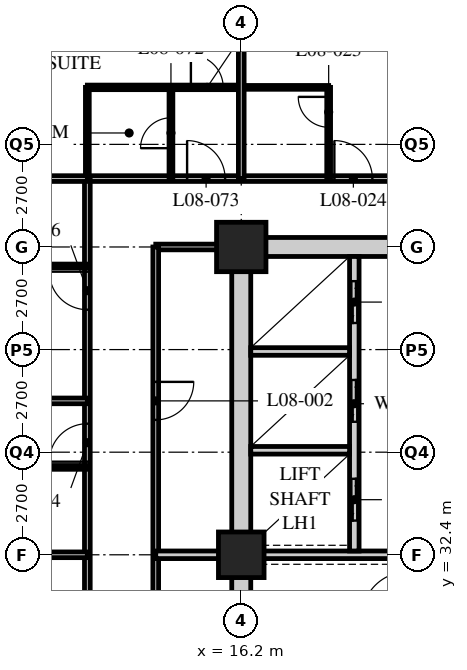
"""IFC4 building model, lengths in metres.
Left out: names, types, materials, properties, quantities, classifications, styles, units other than length and angle.
Written with IfcOpenShell. Run it as: python <this file> out.ifc"""

import sys

from ifc_helpers import new_model, si_unit, direction, frame, frame_2d, origin, origin_2d, place, context, subcontext, project, spatial, rectangle, hollow_rectangle, extrude, element, fill, save


model = new_model("IFC4")
c1 = context("Model", 3, precision=1e-05, world=origin(), true_north=direction((0.0, 1.0)))
c2 = subcontext(c1, "Body", "Model", "MODEL_VIEW")
j1 = project(units=[si_unit("LENGTHUNIT", "METRE"), si_unit("PLANEANGLEUNIT", "RADIAN")], contexts=[c1])
p1 = place(None, origin())
s1 = spatial("IfcSite", under=j1, at=p1, CompositionType="ELEMENT")
p2 = place(p1, origin())
s2 = spatial("IfcBuilding", under=s1, at=p2, CompositionType="ELEMENT")
p3 = place(p2, frame((0.0, 0.0, 39.8)))
s3 = spatial("IfcBuildingStorey", under=s2, at=p3, CompositionType="ELEMENT", Elevation=39.8)
p4 = place(p3, frame((16.2, 32.4, 0.0), z_axis=(0.0, 0.0, 1.0), x_axis=(1.0, 0.0, 0.0)))
e1 = element("IfcColumn", 1, at=p4, inside=s3, PredefinedType="COLUMN", context=c2, shape_type="SweptSolid", body=[
    extrude(hollow_rectangle(XDim=1.2, YDim=1.2, WallThickness=0.12, at=origin_2d()), origin(), (0.0, 0.0, 1.0), 3.4),
])
p5 = place(p3, frame((16.2, 40.5, 0.0), z_axis=(0.0, 0.0, 1.0), x_axis=(1.0, 0.0, 0.0)))
e2 = element("IfcColumn", 2, at=p5, inside=s3, PredefinedType="COLUMN", context=c2, shape_type="SweptSolid", body=[
    extrude(hollow_rectangle(XDim=1.3, YDim=1.3, WallThickness=0.13, at=origin_2d()), origin(), (0.0, 0.0, 1.0), 3.4),
])
p6 = place(p3, frame((12.15, 42.3, 0.0), z_axis=(0.0, 0.0, 1.0), x_axis=(1.0, 0.0, 0.0)))
e3 = element("IfcWall", 3, at=p6, inside=s3, PredefinedType="PARTITIONING", context=c2, shape_type="SweptSolid", body=[
    extrude(rectangle(XDim=32.4, YDim=0.15, at=frame_2d((16.2, 0.0))), origin(), (0.0, 0.0, 1.0), 3.19),
])
p7 = place(p6, frame((6.5, 0.0, 0.0)))
e4 = element("IfcOpeningElement", 4, at=p7, cuts=e3, PredefinedType="OPENING", context=c2, shape_type="SweptSolid", body=[
    extrude(rectangle(XDim=1.0, YDim=2.1, at=frame_2d((0.5, 1.05))), frame((0.0, 0.085, 0.0), z_axis=(0.0, -1.0, 0.0), x_axis=(1.0, 0.0, 0.0)), (0.0, 0.0, 1.0), 0.17),
])
p8 = place(p6, frame((8.4, 0.0, 0.0)))
e5 = element("IfcOpeningElement", 5, at=p8, cuts=e3, PredefinedType="OPENING", context=c2, shape_type="SweptSolid", body=[
    extrude(rectangle(XDim=1.0, YDim=2.1, at=frame_2d((0.5, 1.05))), frame((0.0, 0.085, 0.0), z_axis=(0.0, -1.0, 0.0), x_axis=(1.0, 0.0, 0.0)), (0.0, 0.0, 1.0), 0.17),
])
p9 = place(p6, frame((14.6, 0.0, 0.0)))
e6 = element("IfcOpeningElement", 6, at=p9, cuts=e3, PredefinedType="OPENING", context=c2, shape_type="SweptSolid", body=[
    extrude(rectangle(XDim=1.0, YDim=2.1, at=frame_2d((0.5, 1.05))), frame((0.0, 0.085, 0.0), z_axis=(0.0, -1.0, 0.0), x_axis=(1.0, 0.0, 0.0)), (0.0, 0.0, 1.0), 0.17),
])
p10 = place(p6, frame((18.65, 0.0, 0.0)))
e7 = element("IfcOpeningElement", 7, at=p10, cuts=e3, PredefinedType="OPENING", context=c2, shape_type="SweptSolid", body=[
    extrude(rectangle(XDim=1.0, YDim=2.1, at=frame_2d((0.5, 1.05))), frame((0.0, 0.085, 0.0), z_axis=(0.0, -1.0, 0.0), x_axis=(1.0, 0.0, 0.0)), (0.0, 0.0, 1.0), 0.17),
])
p11 = place(p6, frame((23.0, 0.0, 0.0)))
e8 = element("IfcOpeningElement", 8, at=p11, cuts=e3, PredefinedType="OPENING", context=c2, shape_type="SweptSolid", body=[
    extrude(rectangle(XDim=1.0, YDim=2.1, at=frame_2d((0.5, 1.05))), frame((0.0, 0.085, 0.0), z_axis=(0.0, -1.0, 0.0), x_axis=(1.0, 0.0, 0.0)), (0.0, 0.0, 1.0), 0.17),
])
p12 = place(p6, frame((26.75, 0.0, 0.0)))
e9 = element("IfcOpeningElement", 9, at=p12, cuts=e3, PredefinedType="OPENING", context=c2, shape_type="SweptSolid", body=[
    extrude(rectangle(XDim=1.0, YDim=2.1, at=frame_2d((0.5, 1.05))), frame((0.0, 0.085, 0.0), z_axis=(0.0, -1.0, 0.0), x_axis=(1.0, 0.0, 0.0)), (0.0, 0.0, 1.0), 0.17),
])
p13 = place(p6, frame((28.775, 0.0, 0.0)))
e10 = element("IfcOpeningElement", 10, at=p13, cuts=e3, PredefinedType="OPENING", context=c2, shape_type="SweptSolid", body=[
    extrude(rectangle(XDim=1.0, YDim=2.1, at=frame_2d((0.5, 1.05))), frame((0.0, 0.085, 0.0), z_axis=(0.0, -1.0, 0.0), x_axis=(1.0, 0.0, 0.0)), (0.0, 0.0, 1.0), 0.17),
])
p14 = place(p6, frame((2.625, 0.0, 0.0)))
e11 = element("IfcOpeningElement", 11, at=p14, cuts=e3, PredefinedType="OPENING", context=c2, shape_type="SweptSolid", body=[
    extrude(rectangle(XDim=1.0, YDim=2.1, at=frame_2d((0.5, 1.05))), frame((0.0, 0.085, 0.0), z_axis=(0.0, -1.0, 0.0), x_axis=(1.0, 0.0, 0.0)), (0.0, 0.0, 1.0), 0.17),
])
p15 = place(p3, frame((12.15, 16.2, 0.0), z_axis=(0.0, 0.0, 1.0), x_axis=(0.0, 1.0, 0.0)))
e12 = element("IfcWall", 12, at=p15, inside=s3, PredefinedType="PARTITIONING", context=c2, shape_type="SweptSolid", body=[
    extrude(rectangle(XDim=26.1, YDim=0.15, at=frame_2d((13.05, 0.0))), origin(), (0.0, 0.0, 1.0), 3.19),
])
p16 = place(p15, frame((2.75, 0.0, 0.0)))
e13 = element("IfcOpeningElement", 13, at=p16, cuts=e12, PredefinedType="OPENING", context=c2, shape_type="SweptSolid", body=[
    extrude(rectangle(XDim=1.0, YDim=2.1, at=frame_2d((0.5, 1.05))), frame((0.0, 0.085, 0.0), z_axis=(0.0, -1.0, 0.0), x_axis=(1.0, 0.0, 0.0)), (0.0, 0.0, 1.0), 0.17),
])
p17 = place(p15, frame((4.35, 0.0, 0.0)))
e14 = element("IfcOpeningElement", 14, at=p17, cuts=e12, PredefinedType="OPENING", context=c2, shape_type="SweptSolid", body=[
    extrude(rectangle(XDim=1.0, YDim=2.1, at=frame_2d((0.5, 1.05))), frame((0.0, 0.085, 0.0), z_axis=(0.0, -1.0, 0.0), x_axis=(1.0, 0.0, 0.0)), (0.0, 0.0, 1.0), 0.17),
])
p18 = place(p15, frame((10.55, 0.0, 0.0)))
e15 = element("IfcOpeningElement", 15, at=p18, cuts=e12, PredefinedType="OPENING", context=c2, shape_type="SweptSolid", body=[
    extrude(rectangle(XDim=1.0, YDim=2.1, at=frame_2d((0.5, 1.05))), frame((0.0, 0.085, 0.0), z_axis=(0.0, -1.0, 0.0), x_axis=(1.0, 0.0, 0.0)), (0.0, 0.0, 1.0), 0.17),
])
p19 = place(p15, frame((12.45, 0.0, 0.0)))
e16 = element("IfcOpeningElement", 16, at=p19, cuts=e12, PredefinedType="OPENING", context=c2, shape_type="SweptSolid", body=[
    extrude(rectangle(XDim=1.0, YDim=2.1, at=frame_2d((0.5, 1.05))), frame((0.0, 0.085, 0.0), z_axis=(0.0, -1.0, 0.0), x_axis=(1.0, 0.0, 0.0)), (0.0, 0.0, 1.0), 0.17),
])
p20 = place(p15, frame((18.65, 0.0, 0.0)))
e17 = element("IfcOpeningElement", 17, at=p20, cuts=e12, PredefinedType="OPENING", context=c2, shape_type="SweptSolid", body=[
    extrude(rectangle(XDim=1.0, YDim=2.1, at=frame_2d((0.5, 1.05))), frame((0.0, 0.085, 0.0), z_axis=(0.0, -1.0, 0.0), x_axis=(1.0, 0.0, 0.0)), (0.0, 0.0, 1.0), 0.17),
])
p21 = place(p15, frame((22.65, 0.0, 0.0)))
e18 = element("IfcOpeningElement", 18, at=p21, cuts=e12, PredefinedType="OPENING", context=c2, shape_type="SweptSolid", body=[
    extrude(rectangle(XDim=1.0, YDim=2.1, at=frame_2d((0.5, 1.05))), frame((0.0, 0.085, 0.0), z_axis=(0.0, -1.0, 0.0), x_axis=(1.0, 0.0, 0.0)), (0.0, 0.0, 1.0), 0.17),
])
p22 = place(p3, frame((16.0, 40.5, 0.0), z_axis=(0.0, 0.0, 1.0), x_axis=(-1.0, 0.0, 0.0)))
e19 = element("IfcWall", 19, at=p22, inside=s3, PredefinedType="PARTITIONING", context=c2, shape_type="SweptSolid", body=[
    extrude(rectangle(XDim=2.05, YDim=0.15, at=frame_2d((1.025, 0.0))), origin(), (0.0, 0.0, 1.0), 2.578),
])
p23 = place(p3, frame((13.95, 40.5, 0.0), z_axis=(0.0, 0.0, 1.0), x_axis=(0.0, -1.0, 0.0)))
e20 = element("IfcWall", 20, at=p23, inside=s3, PredefinedType="PARTITIONING", context=c2, shape_type="SweptSolid", body=[
    extrude(rectangle(XDim=22.5, YDim=0.15, at=frame_2d((11.25, 0.0))), origin(), (0.0, 0.0, 1.0), 3.19),
])
p24 = place(p23, frame((11.65, 0.0, 0.0)))
e21 = element("IfcOpeningElement", 21, at=p24, cuts=e20, PredefinedType="OPENING", context=c2, shape_type="SweptSolid", body=[
    extrude(rectangle(XDim=1.0, YDim=2.1, at=frame_2d((0.5, 1.05))), frame((0.0, 0.085, 0.0), z_axis=(0.0, -1.0, 0.0), x_axis=(1.0, 0.0, 0.0)), (0.0, 0.0, 1.0), 0.17),
])
p25 = place(p23, frame((3.55, 0.0, 0.0)))
e22 = element("IfcOpeningElement", 22, at=p25, cuts=e20, PredefinedType="OPENING", context=c2, shape_type="SweptSolid", body=[
    extrude(rectangle(XDim=1.0, YDim=2.1, at=frame_2d((0.5, 1.05))), frame((0.0, 0.085, 0.0), z_axis=(0.0, -1.0, 0.0), x_axis=(1.0, 0.0, 0.0)), (0.0, 0.0, 1.0), 0.17),
])
p26 = place(p3, frame((13.95, 32.4, 0.0), z_axis=(0.0, 0.0, 1.0), x_axis=(1.0, 0.0, 0.0)))
e23 = element("IfcWall", 23, at=p26, inside=s3, PredefinedType="SOLIDWALL", context=c2, shape_type="SweptSolid", body=[
    extrude(rectangle(XDim=2.25, YDim=0.2, at=frame_2d((1.125, 0.0))), origin(), (0.0, 0.0, 1.0), 2.578),
])
p27 = place(p3, frame((16.2, 44.7, 0.0), z_axis=(0.0, 0.0, 1.0), x_axis=(1.0, 0.0, 0.0)))
e24 = element("IfcWall", 24, at=p27, inside=s3, PredefinedType="PARTITIONING", context=c2, shape_type="SweptSolid", body=[
    extrude(rectangle(XDim=2.3, YDim=0.1, at=frame_2d((1.15, 0.0))), origin(), (0.0, 0.0, 1.0), 3.19),
])
p28 = place(p3, frame((18.5, 42.3, 0.0), z_axis=(0.0, 0.0, 1.0), x_axis=(0.0, 1.0, 0.0)))
e25 = element("IfcWall", 25, at=p28, inside=s3, PredefinedType="PARTITIONING", context=c2, shape_type="SweptSolid", body=[
    extrude(rectangle(XDim=2.4, YDim=0.1, at=frame_2d((1.2, 0.0))), origin(), (0.0, 0.0, 1.0), 3.19),
])
p29 = place(p28, frame((1.35, 0.0, 0.0)))
e26 = element("IfcOpeningElement", 26, at=p29, cuts=e25, PredefinedType="OPENING", context=c2, shape_type="SweptSolid", body=[
    extrude(rectangle(XDim=0.8, YDim=2.1, at=frame_2d((0.4, 1.05))), frame((0.0, 0.06, 0.0), z_axis=(0.0, -1.0, 0.0), x_axis=(1.0, 0.0, 0.0)), (0.0, 0.0, 1.0), 0.12),
])
p30 = place(p3, frame((12.15, 32.4, 0.0), z_axis=(0.0, 0.0, 1.0), x_axis=(-1.0, 0.0, 0.0)))
e27 = element("IfcWall", 27, at=p30, inside=s3, PredefinedType="PARTITIONING", context=c2, shape_type="SweptSolid", body=[
    extrude(rectangle(XDim=11.85, YDim=0.15, at=frame_2d((5.925, 0.0))), origin(), (0.0, 0.0, 1.0), 2.578),
])
p31 = place(p3, frame((12.15, 34.7, 0.0), z_axis=(0.0, 0.0, 1.0), x_axis=(-1.0, 0.0, 0.0)))
e28 = element("IfcWall", 28, at=p31, inside=s3, PredefinedType="PARTITIONING", context=c2, shape_type="SweptSolid", body=[
    extrude(rectangle(XDim=3.0, YDim=0.1, at=frame_2d((1.5, 0.0))), origin(), (0.0, 0.0, 1.0), 3.19),
])
p32 = place(p31, frame((1.95, 0.0, 0.0)))
e29 = element("IfcOpeningElement", 29, at=p32, cuts=e28, PredefinedType="OPENING", context=c2, shape_type="SweptSolid", body=[
    extrude(rectangle(XDim=0.8, YDim=2.1, at=frame_2d((0.4, 1.05))), frame((0.0, 0.06, 0.0), z_axis=(0.0, -1.0, 0.0), x_axis=(1.0, 0.0, 0.0)), (0.0, 0.0, 1.0), 0.12),
])
p33 = place(p3, frame((12.15, 36.45, 0.0), z_axis=(0.0, 0.0, 1.0), x_axis=(-1.0, 0.0, 0.0)))
e30 = element("IfcWall", 30, at=p33, inside=s3, PredefinedType="PARTITIONING", context=c2, shape_type="SweptSolid", body=[
    extrude(rectangle(XDim=11.85, YDim=0.15, at=frame_2d((5.925, 0.0))), origin(), (0.0, 0.0, 1.0), 3.19),
])
p34 = place(p3, frame((12.15, 40.0, 0.0), z_axis=(0.0, 0.0, 1.0), x_axis=(-1.0, 0.0, 0.0)))
e31 = element("IfcWall", 31, at=p34, inside=s3, PredefinedType="PARTITIONING", context=c2, shape_type="SweptSolid", body=[
    extrude(rectangle(XDim=3.515, YDim=0.1, at=frame_2d((1.757, 0.0))), origin(), (0.0, 0.0, 1.0), 3.19),
])
p35 = place(p34, frame((1.965, 0.0, 0.0)))
e32 = element("IfcOpeningElement", 32, at=p35, cuts=e31, PredefinedType="OPENING", context=c2, shape_type="SweptSolid", body=[
    extrude(rectangle(XDim=0.8, YDim=2.1, at=frame_2d((0.4, 1.05))), frame((0.0, 0.06, 0.0), z_axis=(0.0, -1.0, 0.0), x_axis=(1.0, 0.0, 0.0)), (0.0, 0.0, 1.0), 0.12),
])
p36 = place(p3, frame((12.15, 44.7, 0.0), z_axis=(0.0, 0.0, 1.0), x_axis=(1.0, 0.0, 0.0)))
e33 = element("IfcWall", 33, at=p36, inside=s3, PredefinedType="PARTITIONING", context=c2, shape_type="SweptSolid", body=[
    extrude(rectangle(XDim=4.05, YDim=0.12, at=frame_2d((2.025, 0.0))), origin(), (0.0, 0.0, 1.0), 3.19),
])
p37 = place(p36, frame((2.725, 0.0, 0.0)))
e34 = element("IfcOpeningElement", 34, at=p37, cuts=e33, PredefinedType="OPENING", context=c2, shape_type="SweptSolid", body=[
    extrude(rectangle(XDim=0.85, YDim=2.1, at=frame_2d((0.425, 1.05))), frame((0.0, 0.07, 0.0), z_axis=(0.0, -1.0, 0.0), x_axis=(1.0, 0.0, 0.0)), (0.0, 0.0, 1.0), 0.14),
])
p38 = place(p3, frame((14.35, 42.3, 0.0), z_axis=(0.0, 0.0, 1.0), x_axis=(0.0, 1.0, 0.0)))
e35 = element("IfcWall", 35, at=p38, inside=s3, PredefinedType="PARTITIONING", context=c2, shape_type="SweptSolid", body=[
    extrude(rectangle(XDim=2.4, YDim=0.1, at=frame_2d((1.2, 0.0))), origin(), (0.0, 0.0, 1.0), 3.19),
])
p39 = place(p38, frame((0.8, 0.0, 0.0)))
e36 = element("IfcOpeningElement", 36, at=p39, cuts=e35, PredefinedType="OPENING", context=c2, shape_type="SweptSolid", body=[
    extrude(rectangle(XDim=0.8, YDim=2.1, at=frame_2d((0.4, 1.05))), frame((0.0, 0.06, 0.0), z_axis=(0.0, -1.0, 0.0), x_axis=(1.0, 0.0, 0.0)), (0.0, 0.0, 1.0), 0.12),
])
p40 = place(p3, frame((12.15, 42.3, 0.0), z_axis=(0.0, 0.0, 1.0), x_axis=(0.0, 1.0, 0.0)))
e37 = element("IfcWall", 37, at=p40, inside=s3, PredefinedType="PARTITIONING", context=c2, shape_type="SweptSolid", body=[
    extrude(rectangle(XDim=2.4, YDim=0.1, at=frame_2d((1.2, 0.0))), origin(), (0.0, 0.0, 1.0), 3.19),
])
p41 = place(p3, frame((4.35, 42.3, 0.0), z_axis=(0.0, 0.0, 1.0), x_axis=(1.0, 0.0, 0.0)))
e38 = element("IfcWall", 38, at=p41, inside=s3, PredefinedType="PARTITIONING", context=c2, shape_type="SweptSolid", body=[
    extrude(rectangle(XDim=7.8, YDim=0.15, at=frame_2d((3.9, 0.0))), origin(), (0.0, 0.0, 1.0), 3.19),
])
p42 = place(p3, frame((16.2, 42.3, 0.0), z_axis=(0.0, 0.0, 1.0), x_axis=(0.0, 1.0, 0.0)))
e39 = element("IfcWall", 39, at=p42, inside=s3, PredefinedType="PARTITIONING", context=c2, shape_type="SweptSolid", body=[
    extrude(rectangle(XDim=6.0, YDim=0.15, at=frame_2d((3.0, 0.0))), origin(), (0.0, 0.0, 1.0), 2.578),
])
p43 = place(p3, frame((15.95, 40.5, 0.0), z_axis=(0.0, 0.0, 1.0), x_axis=(1.0, 0.0, 0.0)))
e40 = element("IfcWall", 40, at=p43, inside=s3, PredefinedType="SOLIDWALL", context=c2, shape_type="SweptSolid", body=[
    extrude(rectangle(XDim=24.8, YDim=0.5, at=frame_2d((12.4, 0.0))), origin(), (0.0, 0.0, 1.0), 2.54),
])
p44 = place(p43, frame((11.5, 0.0, 0.0)))
e41 = element("IfcOpeningElement", 41, at=p44, cuts=e40, PredefinedType="OPENING", context=c2, shape_type="SweptSolid", body=[
    extrude(rectangle(XDim=1.8, YDim=2.4, at=frame_2d((0.9, 1.2))), frame((0.0, 0.26, 0.0), z_axis=(0.0, -1.0, 0.0), x_axis=(1.0, 0.0, 0.0)), (0.0, 0.0, 1.0), 0.52),
])
p45 = place(p3, frame((16.2, 24.55, 0.0), z_axis=(0.0, 0.0, 1.0), x_axis=(0.0, 1.0, 0.0)))
e42 = element("IfcWall", 42, at=p45, inside=s3, PredefinedType="SOLIDWALL", context=c2, shape_type="SweptSolid", body=[
    extrude(rectangle(XDim=15.7, YDim=0.5, at=frame_2d((7.85, 0.0))), origin(), (0.0, 0.0, 1.0), 2.578),
])
p46 = place(p3, frame((16.45, 32.4, 0.0), z_axis=(0.0, 0.0, 1.0), x_axis=(1.0, 0.0, 0.0)))
e43 = element("IfcWall", 43, at=p46, inside=s3, PredefinedType="SOLIDWALL", context=c2, shape_type="SweptSolid", body=[
    extrude(rectangle(XDim=7.95, YDim=0.2, at=frame_2d((3.975, 0.0))), origin(), (0.0, 0.0, 1.0), 2.578),
])
p47 = place(p3, frame((19.175, 32.5, 0.0), z_axis=(0.0, 0.0, 1.0), x_axis=(0.0, 1.0, 0.0)))
e44 = element("IfcWall", 44, at=p47, inside=s3, PredefinedType="SOLIDWALL", context=c2, shape_type="SweptSolid", body=[
    extrude(rectangle(XDim=7.75, YDim=0.25, at=frame_2d((3.875, 0.0))), origin(), (0.0, 0.0, 1.0), 3.19),
])
p48 = place(p47, frame((0.8, 0.0, 0.0)))
e45 = element("IfcOpeningElement", 45, at=p48, cuts=e44, PredefinedType="OPENING", context=c2, shape_type="SweptSolid", body=[
    extrude(rectangle(XDim=1.1, YDim=2.4, at=frame_2d((0.55, 1.2))), frame((0.0, 0.135, 0.0), z_axis=(0.0, -1.0, 0.0), x_axis=(1.0, 0.0, 0.0)), (0.0, 0.0, 1.0), 0.27),
])
p49 = place(p47, frame((3.4, 0.0, 0.0)))
e46 = element("IfcOpeningElement", 46, at=p49, cuts=e44, PredefinedType="OPENING", context=c2, shape_type="SweptSolid", body=[
    extrude(rectangle(XDim=1.1, YDim=2.4, at=frame_2d((0.55, 1.2))), frame((0.0, 0.135, 0.0), z_axis=(0.0, -1.0, 0.0), x_axis=(1.0, 0.0, 0.0)), (0.0, 0.0, 1.0), 0.27),
])
p50 = place(p47, frame((6.0, 0.0, 0.0)))
e47 = element("IfcOpeningElement", 47, at=p50, cuts=e44, PredefinedType="OPENING", context=c2, shape_type="SweptSolid", body=[
    extrude(rectangle(XDim=1.1, YDim=2.4, at=frame_2d((0.55, 1.2))), frame((0.0, 0.135, 0.0), z_axis=(0.0, -1.0, 0.0), x_axis=(1.0, 0.0, 0.0)), (0.0, 0.0, 1.0), 0.27),
])
for number, where, z_axis, x_axis in (
    (48, (16.45, 35.15, 0.0), (0.0, 0.0, 1.0), (1.0, 0.0, 0.0)),
    (49, (16.45, 37.75, 0.0), (0.0, 0.0, 1.0), (1.0, 0.0, 0.0)),
):
    element("IfcWall", number, at=place(p3, frame(where, z_axis=z_axis, x_axis=x_axis)), inside=s3, PredefinedType="SOLIDWALL", context=c2, shape_type="SweptSolid", body=[
        extrude(rectangle(XDim=2.6, YDim=0.2, at=frame_2d((1.3, 0.0))), origin(), (0.0, 0.0, 1.0), 3.19),
    ])
p51 = place(p25, origin())
e50 = element("IfcDoor", 50, at=p51, inside=s3, OperationType="SINGLE_SWING_LEFT", PredefinedType="DOOR", context=c2, shape_type="SweptSolid", body=[
    extrude(rectangle(XDim=1.0, YDim=2.1, at=frame_2d((0.5, 1.05))), frame((0.0, 0.025, 0.0), z_axis=(0.0, -1.0, 0.0), x_axis=(1.0, 0.0, 0.0)), (0.0, 0.0, 1.0), 0.05),
])
fill(e22, e50)
p52 = place(p29, origin())
e51 = element("IfcDoor", 51, at=p52, inside=s3, OperationType="SINGLE_SWING_RIGHT", PredefinedType="DOOR", context=c2, shape_type="SweptSolid", body=[
    extrude(rectangle(XDim=0.8, YDim=2.1, at=frame_2d((0.4, 1.05))), frame((0.0, 0.025, 0.0), z_axis=(0.0, -1.0, 0.0), x_axis=(1.0, 0.0, 0.0)), (0.0, 0.0, 1.0), 0.05),
])
fill(e26, e51)
p53 = place(p7, origin())
e52 = element("IfcDoor", 52, at=p53, inside=s3, OperationType="SINGLE_SWING_LEFT", PredefinedType="DOOR", context=c2, shape_type="SweptSolid", body=[
    extrude(rectangle(XDim=1.0, YDim=2.1, at=frame_2d((0.5, 1.05))), frame((0.0, 0.025, 0.0), z_axis=(0.0, -1.0, 0.0), x_axis=(1.0, 0.0, 0.0)), (0.0, 0.0, 1.0), 0.05),
])
fill(e4, e52)
p54 = place(p20, origin())
e53 = element("IfcDoor", 53, at=p54, inside=s3, OperationType="SINGLE_SWING_LEFT", PredefinedType="DOOR", context=c2, shape_type="SweptSolid", body=[
    extrude(rectangle(XDim=1.0, YDim=2.1, at=frame_2d((0.5, 1.05))), frame((0.0, 0.025, 0.0), z_axis=(0.0, -1.0, 0.0), x_axis=(1.0, 0.0, 0.0)), (0.0, 0.0, 1.0), 0.05),
])
fill(e17, e53)
p55 = place(p21, origin())
e54 = element("IfcDoor", 54, at=p55, inside=s3, OperationType="SINGLE_SWING_RIGHT", PredefinedType="DOOR", context=c2, shape_type="SweptSolid", body=[
    extrude(rectangle(XDim=1.0, YDim=2.1, at=frame_2d((0.5, 1.05))), frame((0.0, 0.025, 0.0), z_axis=(0.0, -1.0, 0.0), x_axis=(1.0, 0.0, 0.0)), (0.0, 0.0, 1.0), 0.05),
])
fill(e18, e54)
p56 = place(p39, origin())
e55 = element("IfcDoor", 55, at=p56, inside=s3, OperationType="SINGLE_SWING_LEFT", PredefinedType="DOOR", context=c2, shape_type="SweptSolid", body=[
    extrude(rectangle(XDim=0.8, YDim=2.1, at=frame_2d((0.4, 1.05))), frame((0.0, 0.025, 0.0), z_axis=(0.0, -1.0, 0.0), x_axis=(1.0, 0.0, 0.0)), (0.0, 0.0, 1.0), 0.05),
])
fill(e36, e55)
p57 = place(p14, origin())
e56 = element("IfcDoor", 56, at=p57, inside=s3, OperationType="SINGLE_SWING_LEFT", PredefinedType="DOOR", context=c2, shape_type="SweptSolid", body=[
    extrude(rectangle(XDim=1.0, YDim=2.1, at=frame_2d((0.5, 1.05))), frame((0.0, 0.025, 0.0), z_axis=(0.0, -1.0, 0.0), x_axis=(1.0, 0.0, 0.0)), (0.0, 0.0, 1.0), 0.05),
])
fill(e11, e56)
p58 = place(p37, origin())
e57 = element("IfcDoor", 57, at=p58, inside=s3, OperationType="SINGLE_SWING_LEFT", PredefinedType="DOOR", context=c2, shape_type="SweptSolid", body=[
    extrude(rectangle(XDim=0.85, YDim=2.1, at=frame_2d((0.425, 1.05))), frame((0.0, 0.025, 0.0), z_axis=(0.0, -1.0, 0.0), x_axis=(1.0, 0.0, 0.0)), (0.0, 0.0, 1.0), 0.05),
])
fill(e34, e57)
p59 = place(p48, origin())
e58 = element("IfcDoor", 58, at=p59, inside=s3, OperationType="DOUBLE_DOOR_SLIDING", PredefinedType="DOOR", context=c2, shape_type="SweptSolid", body=[
    extrude(rectangle(XDim=1.1, YDim=2.4, at=frame_2d((0.55, 1.2))), frame((0.0, 0.025, 0.0), z_axis=(0.0, -1.0, 0.0), x_axis=(1.0, 0.0, 0.0)), (0.0, 0.0, 1.0), 0.05),
])
fill(e45, e58)
p60 = place(p49, origin())
e59 = element("IfcDoor", 59, at=p60, inside=s3, OperationType="DOUBLE_DOOR_SLIDING", PredefinedType="DOOR", context=c2, shape_type="SweptSolid", body=[
    extrude(rectangle(XDim=1.1, YDim=2.4, at=frame_2d((0.55, 1.2))), frame((0.0, 0.025, 0.0), z_axis=(0.0, -1.0, 0.0), x_axis=(1.0, 0.0, 0.0)), (0.0, 0.0, 1.0), 0.05),
])
fill(e46, e59)
p61 = place(p50, origin())
e60 = element("IfcDoor", 60, at=p61, inside=s3, OperationType="DOUBLE_DOOR_SLIDING", PredefinedType="DOOR", context=c2, shape_type="SweptSolid", body=[
    extrude(rectangle(XDim=1.1, YDim=2.4, at=frame_2d((0.55, 1.2))), frame((0.0, 0.025, 0.0), z_axis=(0.0, -1.0, 0.0), x_axis=(1.0, 0.0, 0.0)), (0.0, 0.0, 1.0), 0.05),
])
fill(e47, e60)
save(model, sys.argv[1])
